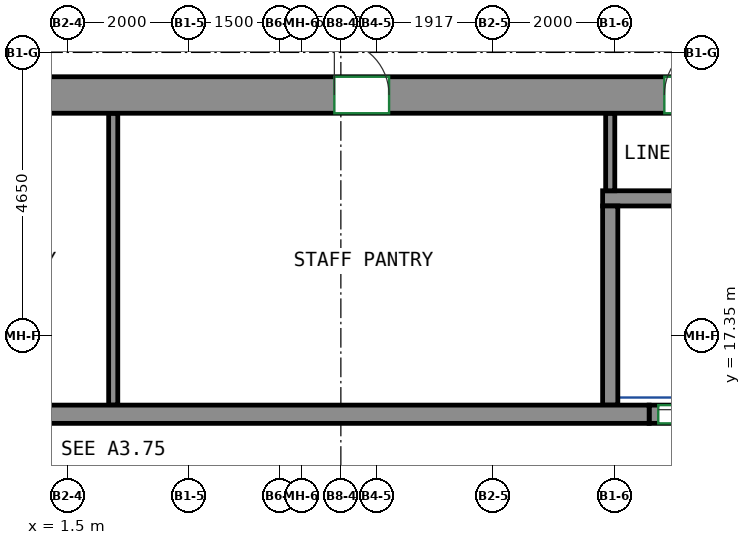
"""IFC4 building model, lengths in metres.
Left out: names, types, materials, properties, quantities, classifications, styles, units other than length and angle.
Written with IfcOpenShell. Run it as: python <this file> out.ifc"""

import sys

from ifc_helpers import new_model, si_unit, direction, frame, frame_2d, origin, place, context, subcontext, project, spatial, rectangle, extrude, source, transform, mapped, element, fill, save


model = new_model("IFC4")
c1 = context("Model", 3, precision=1e-05, world=origin(), true_north=direction((0.0, 1.0)))
c2 = subcontext(c1, "Body", "Model", "MODEL_VIEW")
j1 = project(units=[si_unit("LENGTHUNIT", "METRE"), si_unit("PLANEANGLEUNIT", "RADIAN")], contexts=[c1])
p1 = place(None, origin())
s1 = spatial("IfcSite", under=j1, at=p1, CompositionType="ELEMENT")
p2 = place(p1, origin())
s2 = spatial("IfcBuilding", under=s1, at=p2, CompositionType="ELEMENT")
p3 = place(p2, frame((0.0, 0.0, 298.4)))
s3 = spatial("IfcBuildingStorey", under=s2, at=p3, CompositionType="ELEMENT", Elevation=298.4)
m1 = source(origin(), c2, "Body", "SweptSolid", [
    extrude(rectangle(XDim=33.3, YDim=0.6, at=frame_2d((16.65, 0.0))), origin(), (0.0, 0.0, 1.0), 3.12),
])
p4 = place(p3, frame((-15.6, 21.3, 0.0), z_axis=(0.0, 0.0, 1.0), x_axis=(1.0, 0.0, 0.0)))
e1 = element("IfcWall", 1, at=p4, inside=s3, PredefinedType="SHEAR", context=c2, shape_type="MappedRepresentation", body=[
    mapped(m1, transform((0.0, 0.0, 0.0))),
])
p5 = place(p4, frame((5.708, 0.0, 0.0)))
e2 = element("IfcOpeningElement", 2, at=p5, cuts=e1, PredefinedType="OPENING", context=c2, shape_type="SweptSolid", body=[
    extrude(rectangle(XDim=0.9, YDim=2.1, at=frame_2d((0.45, 1.05))), frame((0.0, 0.31, 0.0), z_axis=(0.0, -1.0, 0.0), x_axis=(1.0, 0.0, 0.0)), (0.0, 0.0, 1.0), 0.62),
])
p6 = place(p4, frame((10.773, 0.0, 0.0)))
e3 = element("IfcOpeningElement", 3, at=p6, cuts=e1, PredefinedType="OPENING", context=c2, shape_type="SweptSolid", body=[
    extrude(rectangle(XDim=0.9, YDim=2.1, at=frame_2d((0.45, 1.05))), frame((0.0, 0.31, 0.0), z_axis=(0.0, -1.0, 0.0), x_axis=(1.0, 0.0, 0.0)), (0.0, 0.0, 1.0), 0.62),
])
p7 = place(p4, frame((15.838, 0.0, 0.0)))
e4 = element("IfcOpeningElement", 4, at=p7, cuts=e1, PredefinedType="OPENING", context=c2, shape_type="SweptSolid", body=[
    extrude(rectangle(XDim=0.9, YDim=2.1, at=frame_2d((0.45, 1.05))), frame((0.0, 0.31, 0.0), z_axis=(0.0, -1.0, 0.0), x_axis=(1.0, 0.0, 0.0)), (0.0, 0.0, 1.0), 0.62),
])
p8 = place(p4, frame((21.493, 0.0, 0.0)))
e5 = element("IfcOpeningElement", 5, at=p8, cuts=e1, PredefinedType="OPENING", context=c2, shape_type="SweptSolid", body=[
    extrude(rectangle(XDim=0.9, YDim=2.1, at=frame_2d((0.45, 1.05))), frame((0.0, 0.31, 0.0), z_axis=(0.0, -1.0, 0.0), x_axis=(1.0, 0.0, 0.0)), (0.0, 0.0, 1.0), 0.62),
])
p9 = place(p4, frame((26.92, 0.0, 0.0)))
e6 = element("IfcOpeningElement", 6, at=p9, cuts=e1, PredefinedType="OPENING", context=c2, shape_type="SweptSolid", body=[
    extrude(rectangle(XDim=0.9, YDim=2.1, at=frame_2d((0.45, 1.05))), frame((0.0, 0.31, 0.0), z_axis=(0.0, -1.0, 0.0), x_axis=(1.0, 0.0, 0.0)), (0.0, 0.0, 1.0), 0.62),
])
p10 = place(p4, frame((2.125, 0.0, 0.0)))
e7 = element("IfcOpeningElement", 7, at=p10, cuts=e1, PredefinedType="OPENING", context=c2, shape_type="SweptSolid", body=[
    extrude(rectangle(XDim=0.9, YDim=2.1, at=frame_2d((0.45, 1.05))), frame((0.0, 0.31, 0.0), z_axis=(0.0, -1.0, 0.0), x_axis=(1.0, 0.0, 0.0)), (0.0, 0.0, 1.0), 0.62),
])
p11 = place(p4, frame((30.275, 0.0, 0.0)))
e8 = element("IfcOpeningElement", 8, at=p11, cuts=e1, PredefinedType="OPENING", context=c2, shape_type="SweptSolid", body=[
    extrude(rectangle(XDim=0.9, YDim=2.1, at=frame_2d((0.45, 1.05))), frame((0.0, 0.31, 0.0), z_axis=(0.0, -1.0, 0.0), x_axis=(1.0, 0.0, 0.0)), (0.0, 0.0, 1.0), 0.62),
])
m2 = source(origin(), c2, "Body", "SweptSolid", [
    extrude(rectangle(XDim=22.08, YDim=0.3, at=frame_2d((11.04, 0.0))), origin(), (0.0, 0.0, 1.0), 3.12),
])
p12 = place(p3, frame((-11.01, 16.05, 0.0), z_axis=(0.0, 0.0, 1.0), x_axis=(1.0, 0.0, 0.0)))
e9 = element("IfcWall", 9, at=p12, inside=s3, PredefinedType="SHEAR", context=c2, shape_type="MappedRepresentation", body=[
    mapped(m2, transform((0.0, 0.0, 0.0))),
])
m3 = source(origin(), c2, "Body", "SweptSolid", [
    extrude(rectangle(XDim=1.4, YDim=0.3, at=frame_2d((0.7, 0.0))), origin(), (0.0, 0.0, 1.0), 3.12),
])
p13 = place(p3, frame((11.07, 16.05, 0.0), z_axis=(0.0, 0.0, 1.0), x_axis=(1.0, 0.0, 0.0)))
e10 = element("IfcWall", 10, at=p13, inside=s3, PredefinedType="PARTITIONING", context=c2, shape_type="MappedRepresentation", body=[
    mapped(m3, transform((0.0, 0.0, 0.0))),
])
p14 = place(p13, frame((0.15, 0.0, 0.0)))
e11 = element("IfcOpeningElement", 11, at=p14, cuts=e10, PredefinedType="OPENING", context=c2, shape_type="SweptSolid", body=[
    extrude(rectangle(XDim=1.1, YDim=2.1, at=frame_2d((0.55, 1.05))), frame((0.0, 0.16, 0.0), z_axis=(0.0, -1.0, 0.0), x_axis=(1.0, 0.0, 0.0)), (0.0, 0.0, 1.0), 0.32),
])
m4 = source(origin(), c2, "Body", "SweptSolid", [
    extrude(rectangle(XDim=2.93, YDim=0.25, at=frame_2d((1.465, 0.0))), origin(), (0.0, 0.0, 1.0), 3.12),
])
p15 = place(p3, frame((10.305, 19.6, 0.0), z_axis=(0.0, 0.0, 1.0), x_axis=(1.0, 0.0, 0.0)))
e12 = element("IfcWall", 12, at=p15, inside=s3, PredefinedType="PARTITIONING", context=c2, shape_type="MappedRepresentation", body=[
    mapped(m4, transform((0.0, 0.0, 0.0))),
])
m5 = source(origin(), c2, "Body", "SweptSolid", [
    extrude(rectangle(XDim=3.275, YDim=0.25, at=frame_2d((1.638, 0.0))), origin(), (0.0, 0.0, 1.0), 3.12),
])
p16 = place(p3, frame((10.43, 16.2, 0.0), z_axis=(0.0, 0.0, 1.0), x_axis=(0.0, 1.0, 0.0)))
e13 = element("IfcWall", 13, at=p16, inside=s3, PredefinedType="PARTITIONING", context=c2, shape_type="MappedRepresentation", body=[
    mapped(m5, transform((0.0, 0.0, 0.0))),
])
m6 = source(origin(), c2, "Body", "SweptSolid", [
    extrude(rectangle(XDim=4.8, YDim=0.15, at=frame_2d((2.4, 0.0))), origin(), (0.0, 0.0, 1.0), 3.12),
])
p17 = place(p3, frame((2.256, 16.2, 0.0), z_axis=(0.0, 0.0, 1.0), x_axis=(0.0, 1.0, 0.0)))
e14 = element("IfcWall", 14, at=p17, inside=s3, PredefinedType="PARTITIONING", context=c2, shape_type="MappedRepresentation", body=[
    mapped(m6, transform((0.0, 0.0, 0.0))),
])
m7 = source(origin(), c2, "Body", "SweptSolid", [
    extrude(rectangle(XDim=1.275, YDim=0.15, at=frame_2d((0.637, 0.0))), origin(), (0.0, 0.0, 1.0), 3.12),
])
p18 = place(p3, frame((10.43, 19.725, 0.0), z_axis=(0.0, 0.0, 1.0), x_axis=(0.0, 1.0, 0.0)))
e15 = element("IfcWall", 15, at=p18, inside=s3, PredefinedType="PARTITIONING", context=c2, shape_type="MappedRepresentation", body=[
    mapped(m7, transform((0.0, 0.0, 0.0))),
])
p19 = place(p14, origin())
e16 = element("IfcDoor", 16, at=p19, inside=s3, OperationType="DOUBLE_DOOR_SLIDING", PredefinedType="DOOR", context=c2, shape_type="SweptSolid", body=[
    extrude(rectangle(XDim=1.1, YDim=2.1, at=frame_2d((0.55, 1.05))), frame((0.0, 0.025, 0.0), z_axis=(0.0, -1.0, 0.0), x_axis=(1.0, 0.0, 0.0)), (0.0, 0.0, 1.0), 0.05),
])
fill(e11, e16)
p20 = place(p8, origin())
e17 = element("IfcDoor", 17, at=p20, inside=s3, OperationType="SINGLE_SWING_LEFT", PredefinedType="DOOR", context=c2, shape_type="SweptSolid", body=[
    extrude(rectangle(XDim=0.9, YDim=2.1, at=frame_2d((0.45, 1.05))), frame((0.0, -0.155, 0.0), z_axis=(0.0, -1.0, 0.0), x_axis=(1.0, 0.0, 0.0)), (0.0, 0.0, 1.0), 0.05),
])
fill(e5, e17)
p21 = place(p9, origin())
e18 = element("IfcDoor", 18, at=p21, inside=s3, OperationType="SINGLE_SWING_RIGHT", PredefinedType="DOOR", context=c2, shape_type="SweptSolid", body=[
    extrude(rectangle(XDim=0.9, YDim=2.1, at=frame_2d((0.45, 1.05))), frame((0.0, -0.155, 0.0), z_axis=(0.0, -1.0, 0.0), x_axis=(1.0, 0.0, 0.0)), (0.0, 0.0, 1.0), 0.05),
])
fill(e6, e18)
save(model, sys.argv[1])
